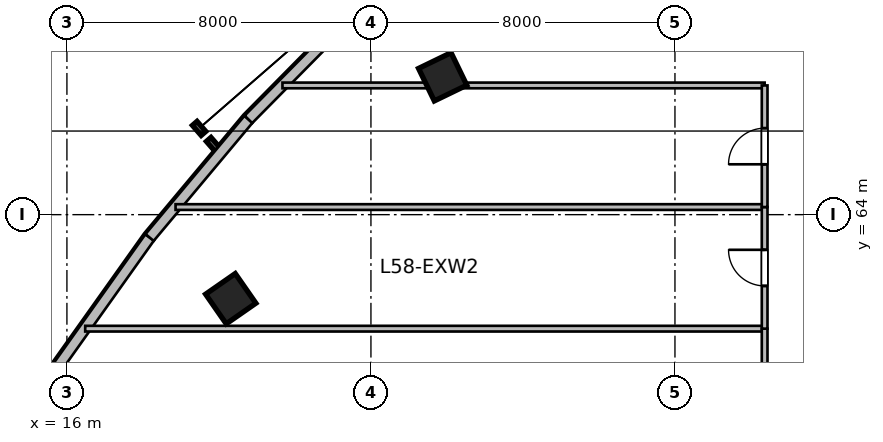
"""IFC4 building model, lengths in metres.
Left out: names, types, materials, properties, quantities, classifications, styles, units other than length and angle.
Written with IfcOpenShell. Run it as: python <this file> out.ifc"""

import sys

from ifc_helpers import new_model, si_unit, direction, frame, frame_2d, origin, origin_2d, place, context, subcontext, project, spatial, rectangle, extrude, source, transform, mapped, element, fill, save


model = new_model("IFC4")
c1 = context("Model", 3, precision=1e-05, world=origin(), true_north=direction((0.0, 1.0)))
c2 = subcontext(c1, "Body", "Model", "MODEL_VIEW")
j1 = project(units=[si_unit("LENGTHUNIT", "METRE"), si_unit("PLANEANGLEUNIT", "RADIAN")], contexts=[c1])
p1 = place(None, origin())
s1 = spatial("IfcSite", under=j1, at=p1, CompositionType="ELEMENT")
p2 = place(p1, origin())
s2 = spatial("IfcBuilding", under=s1, at=p2, CompositionType="ELEMENT")
p3 = place(p2, frame((0.0, 0.0, 239.1)))
s3 = spatial("IfcBuildingStorey", under=s2, at=p3, CompositionType="ELEMENT", Elevation=239.1)
m1 = source(origin(), c2, "Body", "SweptSolid", [
    extrude(rectangle(XDim=0.95, YDim=0.95, at=origin_2d()), origin(), (0.0, 0.0, 1.0), 3.9),
])
for number, where, z_axis, x_axis in (
    (1, (20.311, 61.789, 0.0), (0.0, 0.0, 1.0), (-0.571, 0.821, 0.0)),
    (2, (25.888, 67.627, 0.0), (0.0, 0.0, 1.0), (-0.436, 0.9, 0.0)),
):
    element("IfcColumn", number, at=place(p3, frame(where, z_axis=z_axis, x_axis=x_axis)), inside=s3, PredefinedType="COLUMN", context=c2, shape_type="MappedRepresentation", body=[
        mapped(m1, transform((0.0, 0.0, 0.0), scale=1.0)),
    ])
m2 = source(origin(), c2, "Body", "SweptSolid", [
    extrude(rectangle(XDim=4.149, YDim=0.28, at=frame_2d((2.074, 0.0))), origin(), (0.0, 0.0, 1.0), 3.65),
])
p4 = place(p3, frame((15.771, 60.019, 0.0), z_axis=(0.0, 0.0, 1.0), x_axis=(0.579622789827, 0.814884913048, 0.0)))
e3 = element("IfcWall", 3, at=p4, inside=s3, PredefinedType="SOLIDWALL", context=c2, shape_type="MappedRepresentation", body=[
    mapped(m2, transform((0.0, 0.0, 0.0), scale=1.0)),
])
m3 = source(origin(), c2, "Body", "SweptSolid", [
    extrude(rectangle(XDim=4.052, YDim=0.28, at=frame_2d((2.026, 0.0))), origin(), (0.0, 0.0, 1.0), 3.65),
])
p5 = place(p3, frame((18.176, 63.4, 0.0), z_axis=(0.0, 0.0, 1.0), x_axis=(0.641765301437, 0.76690110045, 0.0)))
e4 = element("IfcWall", 4, at=p5, inside=s3, PredefinedType="SOLIDWALL", context=c2, shape_type="MappedRepresentation", body=[
    mapped(m3, transform((0.0, 0.0, 0.0), scale=1.0)),
])
m4 = source(origin(), c2, "Body", "SweptSolid", [
    extrude(rectangle(XDim=3.955, YDim=0.28, at=frame_2d((1.978, 0.0))), origin(), (0.0, 0.0, 1.0), 3.65),
])
p6 = place(p3, frame((20.776, 66.507, 0.0), z_axis=(0.0, 0.0, 1.0), x_axis=(0.702710517474, 0.711475880569, 0.0)))
e5 = element("IfcWall", 5, at=p6, inside=s3, PredefinedType="SOLIDWALL", context=c2, shape_type="MappedRepresentation", body=[
    mapped(m4, transform((0.0, 0.0, 0.0), scale=1.0)),
])
m5 = source(origin(), c2, "Body", "SweptSolid", [
    extrude(rectangle(XDim=17.879, YDim=0.15, at=frame_2d((8.939, 0.0))), origin(), (0.0, 0.0, 1.0), 3.65),
])
p7 = place(p3, frame((16.481, 61.0, 0.0), z_axis=(0.0, 0.0, 1.0), x_axis=(1.0, 0.0, 0.0)))
e6 = element("IfcWall", 6, at=p7, inside=s3, PredefinedType="PARTITIONING", context=c2, shape_type="MappedRepresentation", body=[
    mapped(m5, transform((0.0, 0.0, 0.0), scale=1.0)),
])
m6 = source(origin(), c2, "Body", "SweptSolid", [
    extrude(rectangle(XDim=3.04, YDim=0.15, at=frame_2d((1.52, 0.0))), origin(), (0.0, 0.0, 1.0), 3.65),
])
p8 = place(p3, frame((34.36, 57.96, 0.0), z_axis=(0.0, 0.0, 1.0), x_axis=(0.0, 1.0, 0.0)))
e7 = element("IfcWall", 7, at=p8, inside=s3, PredefinedType="PARTITIONING", context=c2, shape_type="MappedRepresentation", body=[
    mapped(m6, transform((0.0, 0.0, 0.0), scale=1.0)),
])
m7 = source(origin(), c2, "Body", "SweptSolid", [
    extrude(rectangle(XDim=15.501, YDim=0.15, at=frame_2d((7.751, 0.0))), origin(), (0.0, 0.0, 1.0), 3.65),
])
p9 = place(p3, frame((18.859, 64.2, 0.0), z_axis=(0.0, 0.0, 1.0), x_axis=(1.0, 0.0, 0.0)))
e8 = element("IfcWall", 8, at=p9, inside=s3, PredefinedType="PARTITIONING", context=c2, shape_type="MappedRepresentation", body=[
    mapped(m7, transform((0.0, 0.0, 0.0), scale=1.0)),
])
m8 = source(origin(), c2, "Body", "SweptSolid", [
    extrude(rectangle(XDim=3.2, YDim=0.15, at=frame_2d((1.6, 0.0))), origin(), (0.0, 0.0, 1.0), 3.65),
])
p10 = place(p3, frame((34.36, 61.0, 0.0), z_axis=(0.0, 0.0, 1.0), x_axis=(0.0, 1.0, 0.0)))
e9 = element("IfcWall", 9, at=p10, inside=s3, PredefinedType="PARTITIONING", context=c2, shape_type="MappedRepresentation", body=[
    mapped(m8, transform((0.0, 0.0, 0.0), scale=1.0)),
])
p11 = place(p10, frame((1.125, 0.0, 0.0)))
e10 = element("IfcOpeningElement", 10, at=p11, cuts=e9, PredefinedType="OPENING", context=c2, shape_type="SweptSolid", body=[
    extrude(rectangle(XDim=0.95, YDim=2.1, at=frame_2d((0.475, 1.05))), frame((0.0, 0.085, 0.0), z_axis=(0.0, -1.0, 0.0), x_axis=(1.0, 0.0, 0.0)), (0.0, 0.0, 1.0), 0.17),
])
m9 = source(origin(), c2, "Body", "SweptSolid", [
    extrude(rectangle(XDim=12.688, YDim=0.15, at=frame_2d((6.344, 0.0))), origin(), (0.0, 0.0, 1.0), 3.65),
])
p12 = place(p3, frame((21.672, 67.4, 0.0), z_axis=(0.0, 0.0, 1.0), x_axis=(1.0, 0.0, 0.0)))
e11 = element("IfcWall", 11, at=p12, inside=s3, PredefinedType="PARTITIONING", context=c2, shape_type="MappedRepresentation", body=[
    mapped(m9, transform((0.0, 0.0, 0.0), scale=1.0)),
])
p13 = place(p3, frame((34.36, 64.2, 0.0), z_axis=(0.0, 0.0, 1.0), x_axis=(0.0, 1.0, 0.0)))
e12 = element("IfcWall", 12, at=p13, inside=s3, PredefinedType="PARTITIONING", context=c2, shape_type="MappedRepresentation", body=[
    mapped(m8, transform((0.0, 0.0, 0.0), scale=1.0)),
])
p14 = place(p13, frame((1.125, 0.0, 0.0)))
e13 = element("IfcOpeningElement", 13, at=p14, cuts=e12, PredefinedType="OPENING", context=c2, shape_type="SweptSolid", body=[
    extrude(rectangle(XDim=0.95, YDim=2.1, at=frame_2d((0.475, 1.05))), frame((0.0, 0.085, 0.0), z_axis=(0.0, -1.0, 0.0), x_axis=(1.0, 0.0, 0.0)), (0.0, 0.0, 1.0), 0.17),
])
m10 = source(origin(), c2, "Body", "SweptSolid", [
    extrude(rectangle(XDim=0.95, YDim=2.1, at=frame_2d((0.475, 1.05))), frame((0.0, 0.025, 0.0), z_axis=(0.0, -1.0, 0.0), x_axis=(1.0, 0.0, 0.0)), (0.0, 0.0, 1.0), 0.05),
])
p15 = place(p11, origin())
e14 = element("IfcDoor", 14, at=p15, inside=s3, OperationType="SINGLE_SWING_RIGHT", PredefinedType="DOOR", context=c2, shape_type="MappedRepresentation", body=[
    mapped(m10, transform((0.0, 0.0, 0.0), scale=1.0)),
])
fill(e10, e14)
p16 = place(p14, origin())
e15 = element("IfcDoor", 15, at=p16, inside=s3, OperationType="SINGLE_SWING_LEFT", PredefinedType="DOOR", context=c2, shape_type="MappedRepresentation", body=[
    mapped(m10, transform((0.0, 0.0, 0.0), scale=1.0)),
])
fill(e13, e15)
save(model, sys.argv[1])
